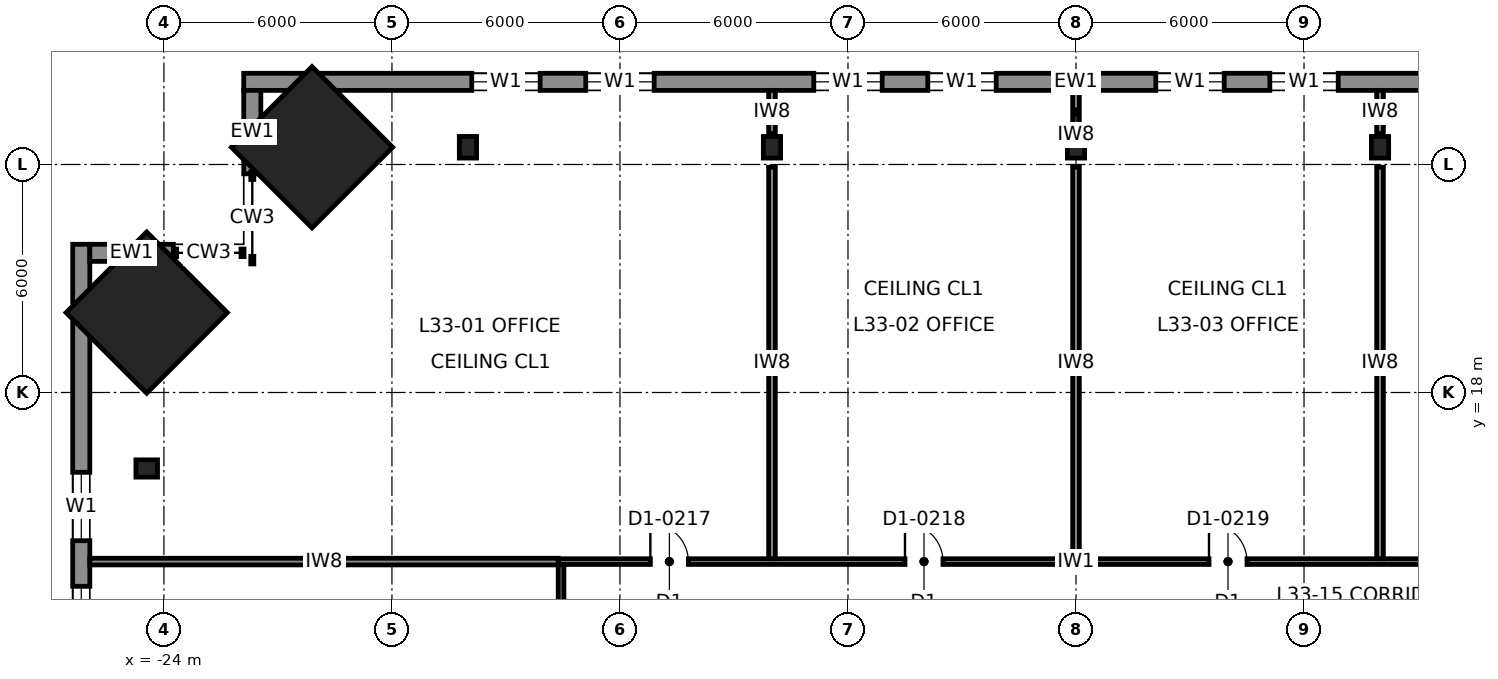
"""IFC4 building model, lengths in metres.
Left out: names, types, materials, properties, quantities, classifications, styles, units other than length and angle.
Written with IfcOpenShell. Run it as: python <this file> out.ifc"""

import sys

from ifc_helpers import new_model, si_unit, direction, frame, frame_2d, origin, origin_2d, place, context, subcontext, project, spatial, rectangle, i_section, extrude, element, fill, save


model = new_model("IFC4")
c1 = context("Model", 3, precision=1e-05, world=origin(), true_north=direction((0.0, 1.0)))
c2 = subcontext(c1, "Body", "Model", "MODEL_VIEW")
j1 = project(units=[si_unit("LENGTHUNIT", "METRE"), si_unit("PLANEANGLEUNIT", "RADIAN")], contexts=[c1])
p1 = place(None, origin())
s1 = spatial("IfcSite", under=j1, at=p1, CompositionType="ELEMENT")
p2 = place(p1, origin())
s2 = spatial("IfcBuilding", under=s1, at=p2, CompositionType="ELEMENT")
p3 = place(p2, frame((0.0, 0.0, 159.8)))
s3 = spatial("IfcBuildingStorey", under=s2, at=p3, CompositionType="ELEMENT", Elevation=159.8)
for number, where, z_axis, x_axis in (
    (1, (-24.453, 20.103, 0.0), (0.04, -0.04, 0.998), (0.708, 0.707, 0.0)),
    (2, (-20.103, 24.453, 0.0), (0.04, -0.04, 0.998), (0.707, 0.708, 0.0)),
):
    element("IfcColumn", number, at=place(p3, frame(where, z_axis=z_axis, x_axis=x_axis)), inside=s3, PredefinedType="COLUMN", context=c2, shape_type="SweptSolid", body=[
        extrude(rectangle(XDim=3.0, YDim=3.0, at=origin_2d()), origin(), (0.0, 0.0, 1.0), 4.007),
    ])
for number, where, z_axis, x_axis in (
    (3, (0.0, 24.453, 0.0), (0.0, -0.04, 0.999), (1.0, 0.0, 0.0)),
    (4, (8.0, 24.453, 0.0), (0.0, -0.04, 0.999), (1.0, 0.0, 0.0)),
    (5, (-8.0, 24.453, 0.0), (0.0, -0.04, 0.999), (1.0, 0.0, 0.0)),
    (6, (-16.0, 24.453, 0.0), (0.0, -0.04, 0.999), (1.0, 0.0, 0.0)),
    (7, (-24.453, 16.0, 0.0), (0.04, 0.0, 0.999), (0.0, 1.0, 0.0)),
):
    element("IfcColumn", number, at=place(p3, frame(where, z_axis=z_axis, x_axis=x_axis)), inside=s3, PredefinedType="COLUMN", context=c2, shape_type="SweptSolid", body=[
        extrude(i_section(OverallWidth=0.454, OverallDepth=0.569, WebThickness=0.078, FlangeThickness=0.125, at=origin_2d()), origin(), (0.0, 0.0, 1.0), 4.003),
    ])
p4 = place(p3, frame((21.9, 26.175, 0.0), z_axis=(0.0, 0.0, 1.0), x_axis=(-1.0, 0.0, 0.0)))
e8 = element("IfcWall", 8, at=p4, inside=s3, PredefinedType="SOLIDWALL", context=c2, shape_type="SweptSolid", body=[
    extrude(rectangle(XDim=43.8, YDim=0.45, at=frame_2d((21.9, 0.0))), origin(), (0.0, 0.0, 1.0), 3.83),
])
p5 = place(p4, frame((6.0, 0.0, 0.7)))
e9 = element("IfcOpeningElement", 9, at=p5, cuts=e8, PredefinedType="OPENING", context=c2, shape_type="SweptSolid", body=[
    extrude(rectangle(XDim=1.8, YDim=2.6, at=frame_2d((0.9, 1.3))), frame((0.0, 0.235, 0.0), z_axis=(0.0, -1.0, 0.0), x_axis=(1.0, 0.0, 0.0)), (0.0, 0.0, 1.0), 0.47),
])
p6 = place(p4, frame((9.0, 0.0, 0.7)))
e10 = element("IfcOpeningElement", 10, at=p6, cuts=e8, PredefinedType="OPENING", context=c2, shape_type="SweptSolid", body=[
    extrude(rectangle(XDim=1.8, YDim=2.6, at=frame_2d((0.9, 1.3))), frame((0.0, 0.235, 0.0), z_axis=(0.0, -1.0, 0.0), x_axis=(1.0, 0.0, 0.0)), (0.0, 0.0, 1.0), 0.47),
])
p7 = place(p4, frame((15.0, 0.0, 0.7)))
e11 = element("IfcOpeningElement", 11, at=p7, cuts=e8, PredefinedType="OPENING", context=c2, shape_type="SweptSolid", body=[
    extrude(rectangle(XDim=1.8, YDim=2.6, at=frame_2d((0.9, 1.3))), frame((0.0, 0.235, 0.0), z_axis=(0.0, -1.0, 0.0), x_axis=(1.0, 0.0, 0.0)), (0.0, 0.0, 1.0), 0.47),
])
p8 = place(p4, frame((18.0, 0.0, 0.7)))
e12 = element("IfcOpeningElement", 12, at=p8, cuts=e8, PredefinedType="OPENING", context=c2, shape_type="SweptSolid", body=[
    extrude(rectangle(XDim=1.8, YDim=2.6, at=frame_2d((0.9, 1.3))), frame((0.0, 0.235, 0.0), z_axis=(0.0, -1.0, 0.0), x_axis=(1.0, 0.0, 0.0)), (0.0, 0.0, 1.0), 0.47),
])
p9 = place(p4, frame((24.0, 0.0, 0.7)))
e13 = element("IfcOpeningElement", 13, at=p9, cuts=e8, PredefinedType="OPENING", context=c2, shape_type="SweptSolid", body=[
    extrude(rectangle(XDim=1.8, YDim=2.6, at=frame_2d((0.9, 1.3))), frame((0.0, 0.235, 0.0), z_axis=(0.0, -1.0, 0.0), x_axis=(1.0, 0.0, 0.0)), (0.0, 0.0, 1.0), 0.47),
])
p10 = place(p4, frame((27.0, 0.0, 0.7)))
e14 = element("IfcOpeningElement", 14, at=p10, cuts=e8, PredefinedType="OPENING", context=c2, shape_type="SweptSolid", body=[
    extrude(rectangle(XDim=1.8, YDim=2.6, at=frame_2d((0.9, 1.3))), frame((0.0, 0.235, 0.0), z_axis=(0.0, -1.0, 0.0), x_axis=(1.0, 0.0, 0.0)), (0.0, 0.0, 1.0), 0.47),
])
p11 = place(p4, frame((33.0, 0.0, 0.7)))
e15 = element("IfcOpeningElement", 15, at=p11, cuts=e8, PredefinedType="OPENING", context=c2, shape_type="SweptSolid", body=[
    extrude(rectangle(XDim=1.8, YDim=2.6, at=frame_2d((0.9, 1.3))), frame((0.0, 0.235, 0.0), z_axis=(0.0, -1.0, 0.0), x_axis=(1.0, 0.0, 0.0)), (0.0, 0.0, 1.0), 0.47),
])
p12 = place(p4, frame((36.0, 0.0, 0.7)))
e16 = element("IfcOpeningElement", 16, at=p12, cuts=e8, PredefinedType="OPENING", context=c2, shape_type="SweptSolid", body=[
    extrude(rectangle(XDim=1.8, YDim=2.6, at=frame_2d((0.9, 1.3))), frame((0.0, 0.235, 0.0), z_axis=(0.0, -1.0, 0.0), x_axis=(1.0, 0.0, 0.0)), (0.0, 0.0, 1.0), 0.47),
])
p13 = place(p3, frame((-26.175, 21.9, 0.0), z_axis=(0.0, 0.0, 1.0), x_axis=(0.0, -1.0, 0.0)))
e17 = element("IfcWall", 17, at=p13, inside=s3, PredefinedType="SOLIDWALL", context=c2, shape_type="SweptSolid", body=[
    extrude(rectangle(XDim=43.8, YDim=0.45, at=frame_2d((21.9, 0.0))), origin(), (0.0, 0.0, 1.0), 3.83),
])
p14 = place(p13, frame((6.0, 0.0, 0.7)))
e18 = element("IfcOpeningElement", 18, at=p14, cuts=e17, PredefinedType="OPENING", context=c2, shape_type="SweptSolid", body=[
    extrude(rectangle(XDim=1.8, YDim=2.6, at=frame_2d((0.9, 1.3))), frame((0.0, 0.235, 0.0), z_axis=(0.0, -1.0, 0.0), x_axis=(1.0, 0.0, 0.0)), (0.0, 0.0, 1.0), 0.47),
])
p15 = place(p13, frame((9.0, 0.0, 0.7)))
e19 = element("IfcOpeningElement", 19, at=p15, cuts=e17, PredefinedType="OPENING", context=c2, shape_type="SweptSolid", body=[
    extrude(rectangle(XDim=1.8, YDim=2.6, at=frame_2d((0.9, 1.3))), frame((0.0, 0.235, 0.0), z_axis=(0.0, -1.0, 0.0), x_axis=(1.0, 0.0, 0.0)), (0.0, 0.0, 1.0), 0.47),
])
p16 = place(p13, frame((15.0, 0.0, 0.7)))
e20 = element("IfcOpeningElement", 20, at=p16, cuts=e17, PredefinedType="OPENING", context=c2, shape_type="SweptSolid", body=[
    extrude(rectangle(XDim=1.8, YDim=2.6, at=frame_2d((0.9, 1.3))), frame((0.0, 0.235, 0.0), z_axis=(0.0, -1.0, 0.0), x_axis=(1.0, 0.0, 0.0)), (0.0, 0.0, 1.0), 0.47),
])
p17 = place(p13, frame((18.0, 0.0, 0.7)))
e21 = element("IfcOpeningElement", 21, at=p17, cuts=e17, PredefinedType="OPENING", context=c2, shape_type="SweptSolid", body=[
    extrude(rectangle(XDim=1.8, YDim=2.6, at=frame_2d((0.9, 1.3))), frame((0.0, 0.235, 0.0), z_axis=(0.0, -1.0, 0.0), x_axis=(1.0, 0.0, 0.0)), (0.0, 0.0, 1.0), 0.47),
])
p18 = place(p13, frame((24.0, 0.0, 0.7)))
e22 = element("IfcOpeningElement", 22, at=p18, cuts=e17, PredefinedType="OPENING", context=c2, shape_type="SweptSolid", body=[
    extrude(rectangle(XDim=1.8, YDim=2.6, at=frame_2d((0.9, 1.3))), frame((0.0, 0.235, 0.0), z_axis=(0.0, -1.0, 0.0), x_axis=(1.0, 0.0, 0.0)), (0.0, 0.0, 1.0), 0.47),
])
p19 = place(p13, frame((27.0, 0.0, 0.7)))
e23 = element("IfcOpeningElement", 23, at=p19, cuts=e17, PredefinedType="OPENING", context=c2, shape_type="SweptSolid", body=[
    extrude(rectangle(XDim=1.8, YDim=2.6, at=frame_2d((0.9, 1.3))), frame((0.0, 0.235, 0.0), z_axis=(0.0, -1.0, 0.0), x_axis=(1.0, 0.0, 0.0)), (0.0, 0.0, 1.0), 0.47),
])
p20 = place(p13, frame((33.0, 0.0, 0.7)))
e24 = element("IfcOpeningElement", 24, at=p20, cuts=e17, PredefinedType="OPENING", context=c2, shape_type="SweptSolid", body=[
    extrude(rectangle(XDim=1.8, YDim=2.6, at=frame_2d((0.9, 1.3))), frame((0.0, 0.235, 0.0), z_axis=(0.0, -1.0, 0.0), x_axis=(1.0, 0.0, 0.0)), (0.0, 0.0, 1.0), 0.47),
])
p21 = place(p13, frame((36.0, 0.0, 0.7)))
e25 = element("IfcOpeningElement", 25, at=p21, cuts=e17, PredefinedType="OPENING", context=c2, shape_type="SweptSolid", body=[
    extrude(rectangle(XDim=1.8, YDim=2.6, at=frame_2d((0.9, 1.3))), frame((0.0, 0.235, 0.0), z_axis=(0.0, -1.0, 0.0), x_axis=(1.0, 0.0, 0.0)), (0.0, 0.0, 1.0), 0.47),
])
for number, where, z_axis, x_axis in (
    (26, (-21.675, 23.754, 0.0), (0.0, 0.0, 1.0), (0.0, 1.0, 0.0)),
    (27, (-23.754, 21.675, 0.0), (0.0, 0.0, 1.0), (-1.0, 0.0, 0.0)),
):
    element("IfcWall", number, at=place(p3, frame(where, z_axis=z_axis, x_axis=x_axis)), inside=s3, PredefinedType="SOLIDWALL", context=c2, shape_type="SweptSolid", body=[
        extrude(rectangle(XDim=2.196, YDim=0.45, at=frame_2d((1.098, 0.0))), origin(), (0.0, 0.0, 1.0), 3.83),
    ])
p22 = place(p3, frame((-13.625, 13.55, 0.0), z_axis=(0.0, 0.0, 1.0), x_axis=(1.0, 0.0, 0.0)))
e28 = element("IfcWall", 28, at=p22, inside=s3, PredefinedType="PARTITIONING", context=c2, shape_type="SweptSolid", body=[
    extrude(rectangle(XDim=27.25, YDim=0.15, at=frame_2d((13.625, 0.0))), origin(), (0.0, 0.0, 1.0), 3.83),
])
p23 = place(p22, frame((2.425, 0.0, 0.0)))
e29 = element("IfcOpeningElement", 29, at=p23, cuts=e28, PredefinedType="OPENING", context=c2, shape_type="SweptSolid", body=[
    extrude(rectangle(XDim=1.0, YDim=2.3, at=frame_2d((0.5, 1.15))), frame((0.0, 0.085, 0.0), z_axis=(0.0, -1.0, 0.0), x_axis=(1.0, 0.0, 0.0)), (0.0, 0.0, 1.0), 0.17),
])
p24 = place(p22, frame((9.125, 0.0, 0.0)))
e30 = element("IfcOpeningElement", 30, at=p24, cuts=e28, PredefinedType="OPENING", context=c2, shape_type="SweptSolid", body=[
    extrude(rectangle(XDim=1.0, YDim=2.3, at=frame_2d((0.5, 1.15))), frame((0.0, 0.085, 0.0), z_axis=(0.0, -1.0, 0.0), x_axis=(1.0, 0.0, 0.0)), (0.0, 0.0, 1.0), 0.17),
])
p25 = place(p22, frame((17.125, 0.0, 0.0)))
e31 = element("IfcOpeningElement", 31, at=p25, cuts=e28, PredefinedType="OPENING", context=c2, shape_type="SweptSolid", body=[
    extrude(rectangle(XDim=1.0, YDim=2.3, at=frame_2d((0.5, 1.15))), frame((0.0, 0.085, 0.0), z_axis=(0.0, -1.0, 0.0), x_axis=(1.0, 0.0, 0.0)), (0.0, 0.0, 1.0), 0.17),
])
p26 = place(p22, frame((23.825, 0.0, 0.0)))
e32 = element("IfcOpeningElement", 32, at=p26, cuts=e28, PredefinedType="OPENING", context=c2, shape_type="SweptSolid", body=[
    extrude(rectangle(XDim=1.0, YDim=2.3, at=frame_2d((0.5, 1.15))), frame((0.0, 0.085, 0.0), z_axis=(0.0, -1.0, 0.0), x_axis=(1.0, 0.0, 0.0)), (0.0, 0.0, 1.0), 0.17),
])
p27 = place(p3, frame((-13.55, 13.475, 0.0), z_axis=(0.0, 0.0, 1.0), x_axis=(0.0, -1.0, 0.0)))
e33 = element("IfcWall", 33, at=p27, inside=s3, PredefinedType="PARTITIONING", context=c2, shape_type="SweptSolid", body=[
    extrude(rectangle(XDim=27.05, YDim=0.15, at=frame_2d((13.525, 0.0))), origin(), (0.0, 0.0, 1.0), 3.83),
])
p28 = place(p27, frame((22.875, 0.0, 0.0)))
e34 = element("IfcOpeningElement", 34, at=p28, cuts=e33, PredefinedType="OPENING", context=c2, shape_type="SweptSolid", body=[
    extrude(rectangle(XDim=1.0, YDim=2.3, at=frame_2d((0.5, 1.15))), frame((0.0, 0.085, 0.0), z_axis=(0.0, -1.0, 0.0), x_axis=(1.0, 0.0, 0.0)), (0.0, 0.0, 1.0), 0.17),
])
p29 = place(p27, frame((10.275, 0.0, 0.0)))
e35 = element("IfcOpeningElement", 35, at=p29, cuts=e33, PredefinedType="OPENING", context=c2, shape_type="SweptSolid", body=[
    extrude(rectangle(XDim=1.0, YDim=2.3, at=frame_2d((0.5, 1.15))), frame((0.0, 0.085, 0.0), z_axis=(0.0, -1.0, 0.0), x_axis=(1.0, 0.0, 0.0)), (0.0, 0.0, 1.0), 0.17),
])
p30 = place(p27, frame((2.275, 0.0, 0.0)))
e36 = element("IfcOpeningElement", 36, at=p30, cuts=e33, PredefinedType="OPENING", context=c2, shape_type="SweptSolid", body=[
    extrude(rectangle(XDim=1.0, YDim=2.3, at=frame_2d((0.5, 1.15))), frame((0.0, 0.085, 0.0), z_axis=(0.0, -1.0, 0.0), x_axis=(1.0, 0.0, 0.0)), (0.0, 0.0, 1.0), 0.17),
])
p31 = place(p27, frame((17.475, 0.0, 0.0)))
e37 = element("IfcOpeningElement", 37, at=p31, cuts=e33, PredefinedType="OPENING", context=c2, shape_type="SweptSolid", body=[
    extrude(rectangle(XDim=1.0, YDim=2.3, at=frame_2d((0.5, 1.15))), frame((0.0, 0.085, 0.0), z_axis=(0.0, -1.0, 0.0), x_axis=(1.0, 0.0, 0.0)), (0.0, 0.0, 1.0), 0.17),
])
p32 = place(p3, frame((-25.95, 13.55, 0.0), z_axis=(0.0, 0.0, 1.0), x_axis=(1.0, 0.0, 0.0)))
e38 = element("IfcWall", 38, at=p32, inside=s3, PredefinedType="PARTITIONING", context=c2, shape_type="SweptSolid", body=[
    extrude(rectangle(XDim=12.325, YDim=0.175, at=frame_2d((6.163, 0.0))), origin(), (0.0, 0.0, 1.0), 3.83),
])
p33 = place(p3, frame((-8.0, 13.625, 0.0), z_axis=(0.0, 0.0, 1.0), x_axis=(0.0, 1.0, 0.0)))
e39 = element("IfcWall", 39, at=p33, inside=s3, PredefinedType="PARTITIONING", context=c2, shape_type="SweptSolid", body=[
    extrude(rectangle(XDim=10.303, YDim=0.175, at=frame_2d((5.151, 0.0))), origin(), (0.0, 0.0, 1.0), 2.84),
])
p34 = place(p3, frame((-8.0, 24.817, 0.0), z_axis=(0.0, 0.0, 1.0), x_axis=(0.0, 1.0, 0.0)))
e40 = element("IfcWall", 40, at=p34, inside=s3, PredefinedType="PARTITIONING", context=c2, shape_type="SweptSolid", body=[
    extrude(rectangle(XDim=1.133, YDim=0.175, at=frame_2d((0.566, 0.0))), origin(), (0.0, 0.0, 1.0), 3.83),
])
p35 = place(p3, frame((0.0, 13.625, 0.0), z_axis=(0.0, 0.0, 1.0), x_axis=(0.0, 1.0, 0.0)))
e41 = element("IfcWall", 41, at=p35, inside=s3, PredefinedType="PARTITIONING", context=c2, shape_type="SweptSolid", body=[
    extrude(rectangle(XDim=10.303, YDim=0.175, at=frame_2d((5.151, 0.0))), origin(), (0.0, 0.0, 1.0), 2.84),
])
p36 = place(p3, frame((0.0, 24.817, 0.0), z_axis=(0.0, 0.0, 1.0), x_axis=(0.0, 1.0, 0.0)))
e42 = element("IfcWall", 42, at=p36, inside=s3, PredefinedType="PARTITIONING", context=c2, shape_type="SweptSolid", body=[
    extrude(rectangle(XDim=1.133, YDim=0.175, at=frame_2d((0.566, 0.0))), origin(), (0.0, 0.0, 1.0), 3.83),
])
p37 = place(p3, frame((8.0, 13.625, 0.0), z_axis=(0.0, 0.0, 1.0), x_axis=(0.0, 1.0, 0.0)))
e43 = element("IfcWall", 43, at=p37, inside=s3, PredefinedType="PARTITIONING", context=c2, shape_type="SweptSolid", body=[
    extrude(rectangle(XDim=10.303, YDim=0.175, at=frame_2d((5.151, 0.0))), origin(), (0.0, 0.0, 1.0), 2.84),
])
p38 = place(p3, frame((8.0, 24.817, 0.0), z_axis=(0.0, 0.0, 1.0), x_axis=(0.0, 1.0, 0.0)))
e44 = element("IfcWall", 44, at=p38, inside=s3, PredefinedType="PARTITIONING", context=c2, shape_type="SweptSolid", body=[
    extrude(rectangle(XDim=1.133, YDim=0.175, at=frame_2d((0.566, 0.0))), origin(), (0.0, 0.0, 1.0), 3.83),
])
p39 = place(p7, origin())
e45 = element("IfcWindow", 45, at=p39, inside=s3, PartitioningType="SINGLE_PANEL", PredefinedType="WINDOW", context=c2, shape_type="SweptSolid", body=[
    extrude(rectangle(XDim=1.8, YDim=2.6, at=frame_2d((0.9, 1.3))), frame((0.0, 0.03, 0.0), z_axis=(0.0, -1.0, 0.0), x_axis=(1.0, 0.0, 0.0)), (0.0, 0.0, 1.0), 0.06),
])
fill(e11, e45)
p40 = place(p8, origin())
e46 = element("IfcWindow", 46, at=p40, inside=s3, PartitioningType="SINGLE_PANEL", PredefinedType="WINDOW", context=c2, shape_type="SweptSolid", body=[
    extrude(rectangle(XDim=1.8, YDim=2.6, at=frame_2d((0.9, 1.3))), frame((0.0, 0.03, 0.0), z_axis=(0.0, -1.0, 0.0), x_axis=(1.0, 0.0, 0.0)), (0.0, 0.0, 1.0), 0.06),
])
fill(e12, e46)
p41 = place(p9, origin())
e47 = element("IfcWindow", 47, at=p41, inside=s3, PartitioningType="SINGLE_PANEL", PredefinedType="WINDOW", context=c2, shape_type="SweptSolid", body=[
    extrude(rectangle(XDim=1.8, YDim=2.6, at=frame_2d((0.9, 1.3))), frame((0.0, 0.03, 0.0), z_axis=(0.0, -1.0, 0.0), x_axis=(1.0, 0.0, 0.0)), (0.0, 0.0, 1.0), 0.06),
])
fill(e13, e47)
p42 = place(p10, origin())
e48 = element("IfcWindow", 48, at=p42, inside=s3, PartitioningType="SINGLE_PANEL", PredefinedType="WINDOW", context=c2, shape_type="SweptSolid", body=[
    extrude(rectangle(XDim=1.8, YDim=2.6, at=frame_2d((0.9, 1.3))), frame((0.0, 0.03, 0.0), z_axis=(0.0, -1.0, 0.0), x_axis=(1.0, 0.0, 0.0)), (0.0, 0.0, 1.0), 0.06),
])
fill(e14, e48)
p43 = place(p11, origin())
e49 = element("IfcWindow", 49, at=p43, inside=s3, PartitioningType="SINGLE_PANEL", PredefinedType="WINDOW", context=c2, shape_type="SweptSolid", body=[
    extrude(rectangle(XDim=1.8, YDim=2.6, at=frame_2d((0.9, 1.3))), frame((0.0, 0.03, 0.0), z_axis=(0.0, -1.0, 0.0), x_axis=(1.0, 0.0, 0.0)), (0.0, 0.0, 1.0), 0.06),
])
fill(e15, e49)
p44 = place(p12, origin())
e50 = element("IfcWindow", 50, at=p44, inside=s3, PartitioningType="SINGLE_PANEL", PredefinedType="WINDOW", context=c2, shape_type="SweptSolid", body=[
    extrude(rectangle(XDim=1.8, YDim=2.6, at=frame_2d((0.9, 1.3))), frame((0.0, 0.03, 0.0), z_axis=(0.0, -1.0, 0.0), x_axis=(1.0, 0.0, 0.0)), (0.0, 0.0, 1.0), 0.06),
])
fill(e16, e50)
p45 = place(p14, origin())
e51 = element("IfcWindow", 51, at=p45, inside=s3, PartitioningType="SINGLE_PANEL", PredefinedType="WINDOW", context=c2, shape_type="SweptSolid", body=[
    extrude(rectangle(XDim=1.8, YDim=2.6, at=frame_2d((0.9, 1.3))), frame((0.0, 0.03, 0.0), z_axis=(0.0, -1.0, 0.0), x_axis=(1.0, 0.0, 0.0)), (0.0, 0.0, 1.0), 0.06),
])
fill(e18, e51)
p46 = place(p15, origin())
e52 = element("IfcWindow", 52, at=p46, inside=s3, PartitioningType="SINGLE_PANEL", PredefinedType="WINDOW", context=c2, shape_type="SweptSolid", body=[
    extrude(rectangle(XDim=1.8, YDim=2.6, at=frame_2d((0.9, 1.3))), frame((0.0, 0.03, 0.0), z_axis=(0.0, -1.0, 0.0), x_axis=(1.0, 0.0, 0.0)), (0.0, 0.0, 1.0), 0.06),
])
fill(e19, e52)
p47 = place(p23, origin())
e53 = element("IfcDoor", 53, at=p47, inside=s3, OperationType="SINGLE_SWING_LEFT", PredefinedType="DOOR", context=c2, shape_type="SweptSolid", body=[
    extrude(rectangle(XDim=1.0, YDim=2.3, at=frame_2d((0.5, 1.15))), frame((0.0, 0.025, 0.0), z_axis=(0.0, -1.0, 0.0), x_axis=(1.0, 0.0, 0.0)), (0.0, 0.0, 1.0), 0.05),
])
fill(e29, e53)
p48 = place(p24, origin())
e54 = element("IfcDoor", 54, at=p48, inside=s3, OperationType="SINGLE_SWING_LEFT", PredefinedType="DOOR", context=c2, shape_type="SweptSolid", body=[
    extrude(rectangle(XDim=1.0, YDim=2.3, at=frame_2d((0.5, 1.15))), frame((0.0, 0.025, 0.0), z_axis=(0.0, -1.0, 0.0), x_axis=(1.0, 0.0, 0.0)), (0.0, 0.0, 1.0), 0.05),
])
fill(e30, e54)
p49 = place(p25, origin())
e55 = element("IfcDoor", 55, at=p49, inside=s3, OperationType="SINGLE_SWING_LEFT", PredefinedType="DOOR", context=c2, shape_type="SweptSolid", body=[
    extrude(rectangle(XDim=1.0, YDim=2.3, at=frame_2d((0.5, 1.15))), frame((0.0, 0.025, 0.0), z_axis=(0.0, -1.0, 0.0), x_axis=(1.0, 0.0, 0.0)), (0.0, 0.0, 1.0), 0.05),
])
fill(e31, e55)
save(model, sys.argv[1])
